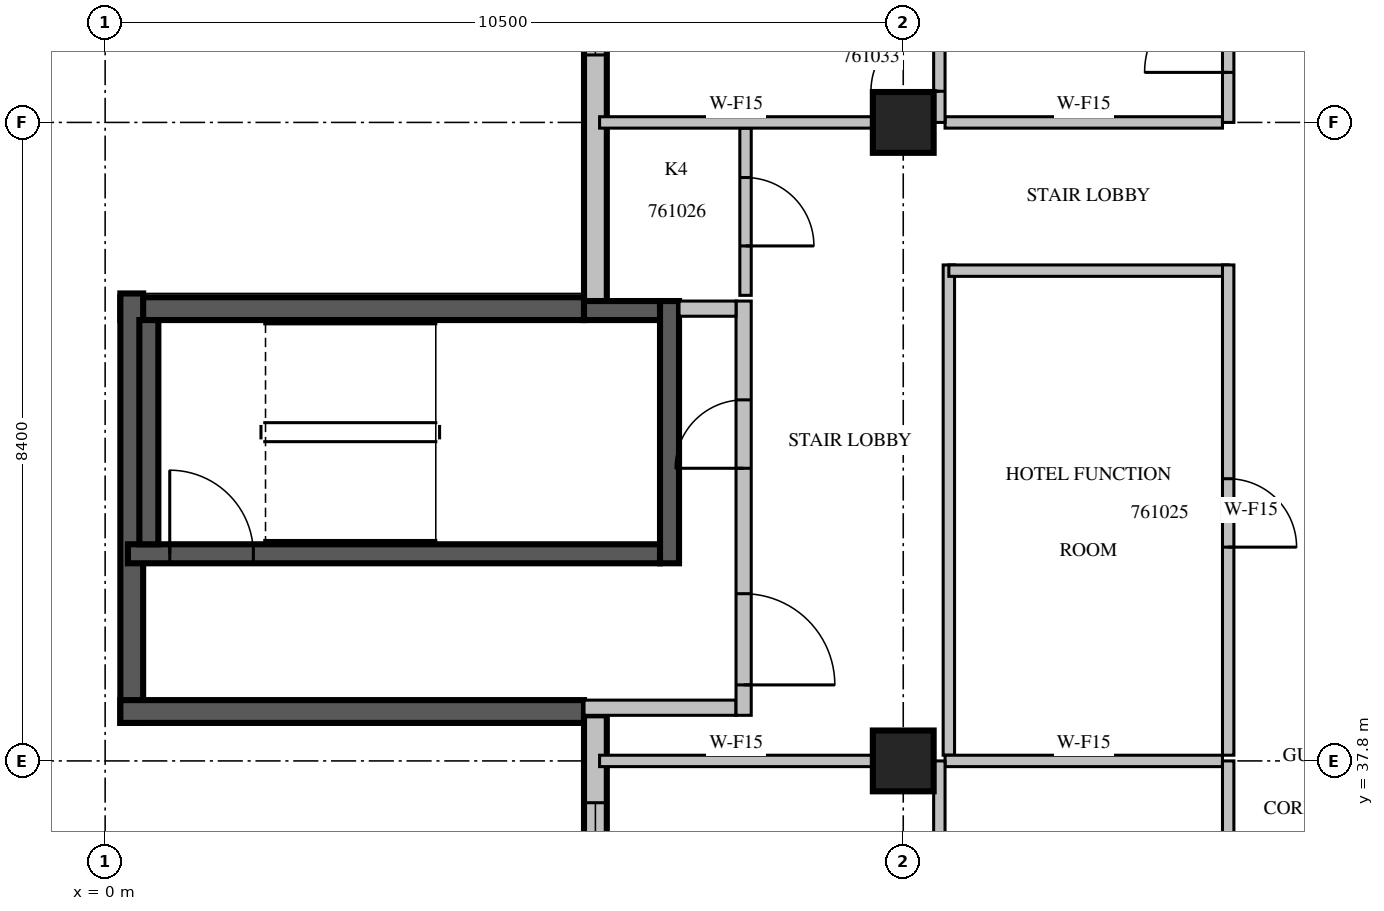
"""IFC4 building model, lengths in metres.
Left out: names, types, materials, properties, quantities, classifications, styles, units other than length and angle.
Written with IfcOpenShell. Run it as: python <this file> out.ifc"""

import sys

from ifc_helpers import new_model, si_unit, direction, frame, frame_2d, origin, origin_2d, place, context, subcontext, project, spatial, rectangle, extrude, source, transform, mapped, element, fill, save


model = new_model("IFC4")
c1 = context("Model", 3, precision=1e-05, world=origin(), true_north=direction((0.0, 1.0)))
c2 = subcontext(c1, "Body", "Model", "MODEL_VIEW")
j1 = project(units=[si_unit("LENGTHUNIT", "METRE"), si_unit("PLANEANGLEUNIT", "RADIAN")], contexts=[c1])
p1 = place(None, origin())
s1 = spatial("IfcSite", under=j1, at=p1, CompositionType="ELEMENT")
p2 = place(p1, origin())
s2 = spatial("IfcBuilding", under=s1, at=p2, CompositionType="ELEMENT")
p3 = place(p2, frame((0.0, 0.0, 265.2)))
s3 = spatial("IfcBuildingStorey", under=s2, at=p3, CompositionType="ELEMENT", Elevation=265.2)
m1 = source(origin(), c2, "Body", "SweptSolid", [
    extrude(rectangle(XDim=0.8, YDim=0.8, at=origin_2d()), origin(), (0.0, 0.0, 1.0), 3.8),
])
for number, where, z_axis, x_axis in (
    (1, (10.5, 37.8, 0.0), (0.0, 0.0, 1.0), (1.0, 0.0, 0.0)),
    (2, (10.5, 46.2, 0.0), (0.0, 0.0, 1.0), (1.0, 0.0, 0.0)),
):
    element("IfcColumn", number, at=place(p3, frame(where, z_axis=z_axis, x_axis=x_axis)), inside=s3, PredefinedType="COLUMN", context=c2, shape_type="MappedRepresentation", body=[
        mapped(m1, transform((0.0, 0.0, 0.0), scale=1.0)),
    ])
m2 = source(origin(), c2, "Body", "SweptSolid", [
    extrude(rectangle(XDim=9.91, YDim=0.3, at=frame_2d((4.955, 0.0))), origin(), (0.0, 0.0, 1.0), 3.4),
])
p4 = place(p3, frame((6.45, 53.76, 0.0), z_axis=(0.0, 0.0, 1.0), x_axis=(0.0, -1.0, 0.0)))
e3 = element("IfcWall", 3, at=p4, inside=s3, PredefinedType="STANDARD", context=c2, shape_type="MappedRepresentation", body=[
    mapped(m2, transform((0.0, 0.0, 0.0), scale=1.0)),
])
m3 = source(origin(), c2, "Body", "SweptSolid", [
    extrude(rectangle(XDim=2.4, YDim=2.3, at=frame_2d((1.2, 1.15))), frame((0.0, 0.16, 0.0), z_axis=(0.0, -1.0, 0.0), x_axis=(1.0, 0.0, 0.0)), (0.0, 0.0, 1.0), 0.32),
])
p5 = place(p4, frame((4.272, 0.0, 0.6)))
e4 = element("IfcOpeningElement", 4, at=p5, cuts=e3, PredefinedType="OPENING", context=c2, shape_type="MappedRepresentation", body=[
    mapped(m3, transform((0.0, 0.0, 0.0), scale=1.0)),
])
p6 = place(p4, frame((0.936, 0.0, 0.6)))
e5 = element("IfcOpeningElement", 5, at=p6, cuts=e3, PredefinedType="OPENING", context=c2, shape_type="MappedRepresentation", body=[
    mapped(m3, transform((0.0, 0.0, 0.0), scale=1.0)),
])
m4 = source(origin(), c2, "Body", "SweptSolid", [
    extrude(rectangle(XDim=6.1, YDim=0.3, at=frame_2d((3.05, 0.0))), origin(), (0.0, 0.0, 1.0), 3.4),
])
p7 = place(p3, frame((6.3, 43.75, 0.0), z_axis=(0.0, 0.0, 1.0), x_axis=(-1.0, 0.0, 0.0)))
e6 = element("IfcWall", 6, at=p7, inside=s3, PredefinedType="SOLIDWALL", context=c2, shape_type="MappedRepresentation", body=[
    mapped(m4, transform((0.0, 0.0, 0.0), scale=1.0)),
])
m5 = source(origin(), c2, "Body", "SweptSolid", [
    extrude(rectangle(XDim=5.65, YDim=0.3, at=frame_2d((2.825, 0.0))), origin(), (0.0, 0.0, 1.0), 3.4),
])
p8 = place(p3, frame((0.35, 43.95, 0.0), z_axis=(0.0, 0.0, 1.0), x_axis=(0.0, -1.0, 0.0)))
e7 = element("IfcWall", 7, at=p8, inside=s3, PredefinedType="SOLIDWALL", context=c2, shape_type="MappedRepresentation", body=[
    mapped(m5, transform((0.0, 0.0, 0.0), scale=1.0)),
])
p9 = place(p3, frame((0.2, 38.45, 0.0), z_axis=(0.0, 0.0, 1.0), x_axis=(1.0, 0.0, 0.0)))
e8 = element("IfcWall", 8, at=p9, inside=s3, PredefinedType="SOLIDWALL", context=c2, shape_type="MappedRepresentation", body=[
    mapped(m4, transform((0.0, 0.0, 0.0), scale=1.0)),
])
m6 = source(origin(), c2, "Body", "SweptSolid", [
    extrude(rectangle(XDim=16.6, YDim=0.3, at=frame_2d((8.3, 0.0))), origin(), (0.0, 0.0, 1.0), 3.4),
])
p10 = place(p3, frame((6.45, 38.4, 0.0), z_axis=(0.0, 0.0, 1.0), x_axis=(0.0, -1.0, 0.0)))
e9 = element("IfcWall", 9, at=p10, inside=s3, PredefinedType="STANDARD", context=c2, shape_type="MappedRepresentation", body=[
    mapped(m6, transform((0.0, 0.0, 0.0), scale=1.0)),
])
m7 = source(origin(), c2, "Body", "SweptSolid", [
    extrude(rectangle(XDim=1.8, YDim=2.3, at=frame_2d((0.9, 1.15))), frame((0.0, 0.16, 0.0), z_axis=(0.0, -1.0, 0.0), x_axis=(1.0, 0.0, 0.0)), (0.0, 0.0, 1.0), 0.32),
])
p11 = place(p10, frame((1.15, 0.0, 0.6)))
e10 = element("IfcOpeningElement", 10, at=p11, cuts=e9, PredefinedType="OPENING", context=c2, shape_type="MappedRepresentation", body=[
    mapped(m7, transform((0.0, 0.0, 0.0), scale=1.0)),
])
p12 = place(p10, frame((4.75, 0.0, 0.6)))
e11 = element("IfcOpeningElement", 11, at=p12, cuts=e9, PredefinedType="OPENING", context=c2, shape_type="MappedRepresentation", body=[
    mapped(m3, transform((0.0, 0.0, 0.0), scale=1.0)),
])
p13 = place(p10, frame((9.438, 0.0, 0.6)))
e12 = element("IfcOpeningElement", 12, at=p13, cuts=e9, PredefinedType="OPENING", context=c2, shape_type="MappedRepresentation", body=[
    mapped(m7, transform((0.0, 0.0, 0.0), scale=1.0)),
])
m8 = source(origin(), c2, "Body", "SweptSolid", [
    extrude(rectangle(XDim=3.0, YDim=2.3, at=frame_2d((1.5, 1.15))), frame((0.0, 0.16, 0.0), z_axis=(0.0, -1.0, 0.0), x_axis=(1.0, 0.0, 0.0)), (0.0, 0.0, 1.0), 0.32),
])
p14 = place(p10, frame((12.7, 0.0, 0.6)))
e13 = element("IfcOpeningElement", 13, at=p14, cuts=e9, PredefinedType="OPENING", context=c2, shape_type="MappedRepresentation", body=[
    mapped(m8, transform((0.0, 0.0, 0.0), scale=1.0)),
])
m9 = source(origin(), c2, "Body", "SweptSolid", [
    extrude(rectangle(XDim=7.0, YDim=0.25, at=frame_2d((3.5, 0.0))), origin(), (0.0, 0.0, 1.0), 3.4),
])
p15 = place(p3, frame((0.3, 40.525, 0.0), z_axis=(0.0, 0.0, 1.0), x_axis=(1.0, 0.0, 0.0)))
e14 = element("IfcWall", 14, at=p15, inside=s3, PredefinedType="SOLIDWALL", context=c2, shape_type="MappedRepresentation", body=[
    mapped(m9, transform((0.0, 0.0, 0.0), scale=1.0)),
])
m10 = source(origin(), c2, "Body", "SweptSolid", [
    extrude(rectangle(XDim=1.1, YDim=2.1, at=frame_2d((0.55, 1.05))), frame((0.0, 0.135, 0.0), z_axis=(0.0, -1.0, 0.0), x_axis=(1.0, 0.0, 0.0)), (0.0, 0.0, 1.0), 0.27),
])
p16 = place(p15, frame((0.55, 0.0, 0.0)))
e15 = element("IfcOpeningElement", 15, at=p16, cuts=e14, PredefinedType="OPENING", context=c2, shape_type="MappedRepresentation", body=[
    mapped(m10, transform((0.0, 0.0, 0.0), scale=1.0)),
])
m11 = source(origin(), c2, "Body", "SweptSolid", [
    extrude(rectangle(XDim=1.0, YDim=0.25, at=frame_2d((0.5, 0.0))), origin(), (0.0, 0.0, 1.0), 3.4),
])
p17 = place(p3, frame((6.3, 43.725, 0.0), z_axis=(0.0, 0.0, 1.0), x_axis=(1.0, 0.0, 0.0)))
e16 = element("IfcWall", 16, at=p17, inside=s3, PredefinedType="SOLIDWALL", context=c2, shape_type="MappedRepresentation", body=[
    mapped(m11, transform((0.0, 0.0, 0.0), scale=1.0)),
])
m12 = source(origin(), c2, "Body", "SweptSolid", [
    extrude(rectangle(XDim=3.45, YDim=0.25, at=frame_2d((1.725, 0.0))), origin(), (0.0, 0.0, 1.0), 3.4),
])
p18 = place(p3, frame((7.425, 40.4, 0.0), z_axis=(0.0, 0.0, 1.0), x_axis=(0.0, 1.0, 0.0)))
e17 = element("IfcWall", 17, at=p18, inside=s3, PredefinedType="SOLIDWALL", context=c2, shape_type="MappedRepresentation", body=[
    mapped(m12, transform((0.0, 0.0, 0.0), scale=1.0)),
])
m13 = source(origin(), c2, "Body", "SweptSolid", [
    extrude(rectangle(XDim=2.95, YDim=0.25, at=frame_2d((1.475, 0.0))), origin(), (0.0, 0.0, 1.0), 3.4),
])
p19 = place(p3, frame((0.575, 40.65, 0.0), z_axis=(0.0, 0.0, 1.0), x_axis=(0.0, 1.0, 0.0)))
e18 = element("IfcWall", 18, at=p19, inside=s3, PredefinedType="SOLIDWALL", context=c2, shape_type="MappedRepresentation", body=[
    mapped(m13, transform((0.0, 0.0, 0.0), scale=1.0)),
])
m14 = source(origin(), c2, "Body", "SweptSolid", [
    extrude(rectangle(XDim=2.0, YDim=0.2, at=frame_2d((1.0, 0.0))), origin(), (0.0, 0.0, 1.0), 3.4),
])
p20 = place(p3, frame((6.3, 38.5, 0.0), z_axis=(0.0, 0.0, 1.0), x_axis=(1.0, 0.0, 0.0)))
e19 = element("IfcWall", 19, at=p20, inside=s3, PredefinedType="PARTITIONING", context=c2, shape_type="MappedRepresentation", body=[
    mapped(m14, transform((0.0, 0.0, 0.0), scale=1.0)),
])
m15 = source(origin(), c2, "Body", "SweptSolid", [
    extrude(rectangle(XDim=5.45, YDim=0.2, at=frame_2d((2.725, 0.0))), origin(), (0.0, 0.0, 1.0), 3.4),
])
p21 = place(p3, frame((8.4, 38.4, 0.0), z_axis=(0.0, 0.0, 1.0), x_axis=(0.0, 1.0, 0.0)))
e20 = element("IfcWall", 20, at=p21, inside=s3, PredefinedType="PARTITIONING", context=c2, shape_type="MappedRepresentation", body=[
    mapped(m15, transform((0.0, 0.0, 0.0), scale=1.0)),
])
m16 = source(origin(), c2, "Body", "SweptSolid", [
    extrude(rectangle(XDim=1.2, YDim=2.1, at=frame_2d((0.6, 1.05))), frame((0.0, 0.11, 0.0), z_axis=(0.0, -1.0, 0.0), x_axis=(1.0, 0.0, 0.0)), (0.0, 0.0, 1.0), 0.22),
])
p22 = place(p21, frame((0.4, 0.0, 0.0)))
e21 = element("IfcOpeningElement", 21, at=p22, cuts=e20, PredefinedType="OPENING", context=c2, shape_type="MappedRepresentation", body=[
    mapped(m16, transform((0.0, 0.0, 0.0), scale=1.0)),
])
m17 = source(origin(), c2, "Body", "SweptSolid", [
    extrude(rectangle(XDim=0.9, YDim=2.1, at=frame_2d((0.45, 1.05))), frame((0.0, 0.11, 0.0), z_axis=(0.0, -1.0, 0.0), x_axis=(1.0, 0.0, 0.0)), (0.0, 0.0, 1.0), 0.22),
])
p23 = place(p21, frame((3.25, 0.0, 0.0)))
e22 = element("IfcOpeningElement", 22, at=p23, cuts=e20, PredefinedType="OPENING", context=c2, shape_type="MappedRepresentation", body=[
    mapped(m17, transform((0.0, 0.0, 0.0), scale=1.0)),
])
m18 = source(origin(), c2, "Body", "SweptSolid", [
    extrude(rectangle(XDim=0.75, YDim=0.2, at=frame_2d((0.375, 0.0))), origin(), (0.0, 0.0, 1.0), 3.4),
])
p24 = place(p3, frame((7.55, 43.75, 0.0), z_axis=(0.0, 0.0, 1.0), x_axis=(1.0, 0.0, 0.0)))
e23 = element("IfcWall", 23, at=p24, inside=s3, PredefinedType="PARTITIONING", context=c2, shape_type="MappedRepresentation", body=[
    mapped(m18, transform((0.0, 0.0, 0.0), scale=1.0)),
])
m19 = source(origin(), c2, "Body", "SweptSolid", [
    extrude(rectangle(XDim=6.45, YDim=0.15, at=frame_2d((3.225, 0.0))), origin(), (0.0, 0.0, 1.0), 3.4),
])
p25 = place(p3, frame((11.1, 44.325, 0.0), z_axis=(0.0, 0.0, 1.0), x_axis=(0.0, -1.0, 0.0)))
e24 = element("IfcWall", 24, at=p25, inside=s3, PredefinedType="PARTITIONING", context=c2, shape_type="MappedRepresentation", body=[
    mapped(m19, transform((0.0, 0.0, 0.0), scale=1.0)),
])
m20 = source(origin(), c2, "Body", "SweptSolid", [
    extrude(rectangle(XDim=3.675, YDim=0.15, at=frame_2d((1.837, 0.0))), origin(), (0.0, 0.0, 1.0), 3.4),
])
p26 = place(p3, frame((14.775, 44.25, 0.0), z_axis=(0.0, 0.0, 1.0), x_axis=(-1.0, 0.0, 0.0)))
e25 = element("IfcWall", 25, at=p26, inside=s3, PredefinedType="PARTITIONING", context=c2, shape_type="MappedRepresentation", body=[
    mapped(m20, transform((0.0, 0.0, 0.0), scale=1.0)),
])
p27 = place(p3, frame((14.775, 37.875, 0.0), z_axis=(0.0, 0.0, 1.0), x_axis=(0.0, 1.0, 0.0)))
e26 = element("IfcWall", 26, at=p27, inside=s3, PredefinedType="PARTITIONING", context=c2, shape_type="MappedRepresentation", body=[
    mapped(m19, transform((0.0, 0.0, 0.0), scale=1.0)),
])
m21 = source(origin(), c2, "Body", "SweptSolid", [
    extrude(rectangle(XDim=0.9, YDim=2.1, at=frame_2d((0.45, 1.05))), frame((0.0, 0.085, 0.0), z_axis=(0.0, -1.0, 0.0), x_axis=(1.0, 0.0, 0.0)), (0.0, 0.0, 1.0), 0.17),
])
p28 = place(p27, frame((2.737, 0.0, 0.0)))
e27 = element("IfcOpeningElement", 27, at=p28, cuts=e26, PredefinedType="OPENING", context=c2, shape_type="MappedRepresentation", body=[
    mapped(m21, transform((0.0, 0.0, 0.0), scale=1.0)),
])
m22 = source(origin(), c2, "Body", "SweptSolid", [
    extrude(rectangle(XDim=2.2, YDim=0.15, at=frame_2d((1.1, 0.0))), origin(), (0.0, 0.0, 1.0), 3.4),
])
p29 = place(p3, frame((8.425, 43.925, 0.0), z_axis=(0.0, 0.0, 1.0), x_axis=(0.0, 1.0, 0.0)))
e28 = element("IfcWall", 28, at=p29, inside=s3, PredefinedType="PARTITIONING", context=c2, shape_type="MappedRepresentation", body=[
    mapped(m22, transform((0.0, 0.0, 0.0), scale=1.0)),
])
p30 = place(p29, frame((0.65, 0.0, 0.0)))
e29 = element("IfcOpeningElement", 29, at=p30, cuts=e28, PredefinedType="OPENING", context=c2, shape_type="MappedRepresentation", body=[
    mapped(m21, transform((0.0, 0.0, 0.0), scale=1.0)),
])
m23 = source(origin(), c2, "Body", "SweptSolid", [
    extrude(rectangle(XDim=3.596, YDim=0.15, at=frame_2d((1.798, 0.0))), origin(), (0.0, 0.0, 1.0), 3.4),
])
p31 = place(p3, frame((10.101, 37.8, 0.0), z_axis=(0.0, 0.0, 1.0), x_axis=(-1.0, 0.0, 0.0)))
e30 = element("IfcWall", 30, at=p31, inside=s3, PredefinedType="PARTITIONING", context=c2, shape_type="MappedRepresentation", body=[
    mapped(m23, transform((0.0, 0.0, 0.0), scale=1.0)),
])
m24 = source(origin(), c2, "Body", "SweptSolid", [
    extrude(rectangle(XDim=3.65, YDim=0.15, at=frame_2d((1.825, 0.0))), origin(), (0.0, 0.0, 1.0), 3.4),
])
p32 = place(p3, frame((14.7, 37.8, 0.0), z_axis=(0.0, 0.0, 1.0), x_axis=(-1.0, 0.0, 0.0)))
e31 = element("IfcWall", 31, at=p32, inside=s3, PredefinedType="PARTITIONING", context=c2, shape_type="MappedRepresentation", body=[
    mapped(m24, transform((0.0, 0.0, 0.0), scale=1.0)),
])
m25 = source(origin(), c2, "Body", "SweptSolid", [
    extrude(rectangle(XDim=8.4, YDim=0.15, at=frame_2d((4.2, 0.0))), origin(), (0.0, 0.0, 1.0), 3.4),
])
p33 = place(p3, frame((10.975, 29.4, 0.0), z_axis=(0.0, 0.0, 1.0), x_axis=(0.0, 1.0, 0.0)))
e32 = element("IfcWall", 32, at=p33, inside=s3, PredefinedType="PARTITIONING", context=c2, shape_type="MappedRepresentation", body=[
    mapped(m25, transform((0.0, 0.0, 0.0), scale=1.0)),
])
m26 = source(origin(), c2, "Body", "SweptSolid", [
    extrude(rectangle(XDim=1.1, YDim=2.1, at=frame_2d((0.55, 1.05))), frame((0.0, 0.085, 0.0), z_axis=(0.0, -1.0, 0.0), x_axis=(1.0, 0.0, 0.0)), (0.0, 0.0, 1.0), 0.17),
])
p34 = place(p33, frame((0.851, 0.0, 0.0)))
e33 = element("IfcOpeningElement", 33, at=p34, cuts=e32, PredefinedType="OPENING", context=c2, shape_type="MappedRepresentation", body=[
    mapped(m26, transform((0.0, 0.0, 0.0), scale=1.0)),
])
p35 = place(p33, frame((3.38, 0.0, 0.0)))
e34 = element("IfcOpeningElement", 34, at=p35, cuts=e32, PredefinedType="OPENING", context=c2, shape_type="MappedRepresentation", body=[
    mapped(m21, transform((0.0, 0.0, 0.0), scale=1.0)),
])
p36 = place(p33, frame((6.179, 0.0, 0.0)))
e35 = element("IfcOpeningElement", 35, at=p36, cuts=e32, PredefinedType="OPENING", context=c2, shape_type="MappedRepresentation", body=[
    mapped(m21, transform((0.0, 0.0, 0.0), scale=1.0)),
])
p37 = place(p3, frame((10.101, 46.2, 0.0), z_axis=(0.0, 0.0, 1.0), x_axis=(-1.0, 0.0, 0.0)))
e36 = element("IfcWall", 36, at=p37, inside=s3, PredefinedType="PARTITIONING", context=c2, shape_type="MappedRepresentation", body=[
    mapped(m23, transform((0.0, 0.0, 0.0), scale=1.0)),
])
p38 = place(p3, frame((14.7, 46.2, 0.0), z_axis=(0.0, 0.0, 1.0), x_axis=(-1.0, 0.0, 0.0)))
e37 = element("IfcWall", 37, at=p38, inside=s3, PredefinedType="PARTITIONING", context=c2, shape_type="MappedRepresentation", body=[
    mapped(m24, transform((0.0, 0.0, 0.0), scale=1.0)),
])
m27 = source(origin(), c2, "Body", "SweptSolid", [
    extrude(rectangle(XDim=7.26, YDim=0.15, at=frame_2d((3.63, 0.0))), origin(), (0.0, 0.0, 1.0), 3.4),
])
p39 = place(p3, frame((10.975, 46.2, 0.0), z_axis=(0.0, 0.0, 1.0), x_axis=(0.0, 1.0, 0.0)))
e38 = element("IfcWall", 38, at=p39, inside=s3, PredefinedType="PARTITIONING", context=c2, shape_type="MappedRepresentation", body=[
    mapped(m27, transform((0.0, 0.0, 0.0), scale=1.0)),
])
p40 = place(p39, frame((1.361, 0.0, 0.0)))
e39 = element("IfcOpeningElement", 39, at=p40, cuts=e38, PredefinedType="OPENING", context=c2, shape_type="MappedRepresentation", body=[
    mapped(m21, transform((0.0, 0.0, 0.0), scale=1.0)),
])
p41 = place(p39, frame((0.41, 0.0, 0.0)))
e40 = element("IfcOpeningElement", 40, at=p41, cuts=e38, PredefinedType="OPENING", context=c2, shape_type="MappedRepresentation", body=[
    mapped(m21, transform((0.0, 0.0, 0.0), scale=1.0)),
])
p42 = place(p39, frame((4.096, 0.0, 0.0)))
e41 = element("IfcOpeningElement", 41, at=p42, cuts=e38, PredefinedType="OPENING", context=c2, shape_type="MappedRepresentation", body=[
    mapped(m21, transform((0.0, 0.0, 0.0), scale=1.0)),
])
p43 = place(p3, frame((14.775, 29.4, 0.0), z_axis=(0.0, 0.0, 1.0), x_axis=(0.0, 1.0, 0.0)))
e42 = element("IfcWall", 42, at=p43, inside=s3, PredefinedType="PARTITIONING", context=c2, shape_type="MappedRepresentation", body=[
    mapped(m25, transform((0.0, 0.0, 0.0), scale=1.0)),
])
p44 = place(p43, frame((0.638, 0.0, 0.0)))
e43 = element("IfcOpeningElement", 43, at=p44, cuts=e42, PredefinedType="OPENING", context=c2, shape_type="MappedRepresentation", body=[
    mapped(m26, transform((0.0, 0.0, 0.0), scale=1.0)),
])
p45 = place(p3, frame((14.775, 46.2, 0.0), z_axis=(0.0, 0.0, 1.0), x_axis=(0.0, 1.0, 0.0)))
e44 = element("IfcWall", 44, at=p45, inside=s3, PredefinedType="PARTITIONING", context=c2, shape_type="MappedRepresentation", body=[
    mapped(m27, transform((0.0, 0.0, 0.0), scale=1.0)),
])
p46 = place(p45, frame((0.658, 0.0, 0.0)))
e45 = element("IfcOpeningElement", 45, at=p46, cuts=e44, PredefinedType="OPENING", context=c2, shape_type="MappedRepresentation", body=[
    mapped(m26, transform((0.0, 0.0, 0.0), scale=1.0)),
])
m28 = source(origin(), c2, "Body", "SweptSolid", [
    extrude(rectangle(XDim=2.4, YDim=2.3, at=frame_2d((1.2, 1.15))), frame((0.0, 0.03, 0.0), z_axis=(0.0, -1.0, 0.0), x_axis=(1.0, 0.0, 0.0)), (0.0, 0.0, 1.0), 0.06),
])
p47 = place(p5, origin())
e46 = element("IfcWindow", 46, at=p47, inside=s3, PartitioningType="SINGLE_PANEL", PredefinedType="WINDOW", context=c2, shape_type="MappedRepresentation", body=[
    mapped(m28, transform((0.0, 0.0, 0.0), scale=1.0)),
])
fill(e4, e46)
m29 = source(origin(), c2, "Body", "SweptSolid", [
    extrude(rectangle(XDim=1.8, YDim=2.3, at=frame_2d((0.9, 1.15))), frame((0.0, 0.03, 0.0), z_axis=(0.0, -1.0, 0.0), x_axis=(1.0, 0.0, 0.0)), (0.0, 0.0, 1.0), 0.06),
])
p48 = place(p11, origin())
e47 = element("IfcWindow", 47, at=p48, inside=s3, PartitioningType="SINGLE_PANEL", PredefinedType="WINDOW", context=c2, shape_type="MappedRepresentation", body=[
    mapped(m29, transform((0.0, 0.0, 0.0), scale=1.0)),
])
fill(e10, e47)
m30 = source(origin(), c2, "Body", "SweptSolid", [
    extrude(rectangle(XDim=1.1, YDim=2.1, at=frame_2d((0.55, 1.05))), frame((0.0, 0.025, 0.0), z_axis=(0.0, -1.0, 0.0), x_axis=(1.0, 0.0, 0.0)), (0.0, 0.0, 1.0), 0.05),
])
p49 = place(p16, origin())
e48 = element("IfcDoor", 48, at=p49, inside=s3, OperationType="SINGLE_SWING_LEFT", PredefinedType="DOOR", context=c2, shape_type="MappedRepresentation", body=[
    mapped(m30, transform((0.0, 0.0, 0.0), scale=1.0)),
])
fill(e15, e48)
m31 = source(origin(), c2, "Body", "SweptSolid", [
    extrude(rectangle(XDim=1.2, YDim=2.1, at=frame_2d((0.6, 1.05))), frame((0.0, 0.025, 0.0), z_axis=(0.0, -1.0, 0.0), x_axis=(1.0, 0.0, 0.0)), (0.0, 0.0, 1.0), 0.05),
])
p50 = place(p22, origin())
e49 = element("IfcDoor", 49, at=p50, inside=s3, OperationType="SINGLE_SWING_RIGHT", PredefinedType="DOOR", context=c2, shape_type="MappedRepresentation", body=[
    mapped(m31, transform((0.0, 0.0, 0.0), scale=1.0)),
])
fill(e21, e49)
m32 = source(origin(), c2, "Body", "SweptSolid", [
    extrude(rectangle(XDim=0.9, YDim=2.1, at=frame_2d((0.45, 1.05))), frame((0.0, 0.025, 0.0), z_axis=(0.0, -1.0, 0.0), x_axis=(1.0, 0.0, 0.0)), (0.0, 0.0, 1.0), 0.05),
])
p51 = place(p23, origin())
e50 = element("IfcDoor", 50, at=p51, inside=s3, OperationType="SINGLE_SWING_LEFT", PredefinedType="DOOR", context=c2, shape_type="MappedRepresentation", body=[
    mapped(m32, transform((0.0, 0.0, 0.0), scale=1.0)),
])
fill(e22, e50)
p52 = place(p28, origin())
e51 = element("IfcDoor", 51, at=p52, inside=s3, OperationType="SINGLE_SWING_RIGHT", PredefinedType="DOOR", context=c2, shape_type="MappedRepresentation", body=[
    mapped(m32, transform((0.0, 0.0, 0.0), scale=1.0)),
])
fill(e27, e51)
p53 = place(p30, origin())
e52 = element("IfcDoor", 52, at=p53, inside=s3, OperationType="SINGLE_SWING_RIGHT", PredefinedType="DOOR", context=c2, shape_type="MappedRepresentation", body=[
    mapped(m32, transform((0.0, 0.0, 0.0), scale=1.0)),
])
fill(e29, e52)
p54 = place(p46, origin())
e53 = element("IfcDoor", 53, at=p54, inside=s3, OperationType="SINGLE_SWING_LEFT", PredefinedType="DOOR", context=c2, shape_type="MappedRepresentation", body=[
    mapped(m30, transform((0.0, 0.0, 0.0), scale=1.0)),
])
fill(e45, e53)
p55 = place(p41, origin())
e54 = element("IfcDoor", 54, at=p55, inside=s3, OperationType="SINGLE_SWING_LEFT", PredefinedType="DOOR", context=c2, shape_type="MappedRepresentation", body=[
    mapped(m32, transform((0.0, 0.0, 0.0), scale=1.0)),
])
fill(e40, e54)
save(model, sys.argv[1])
